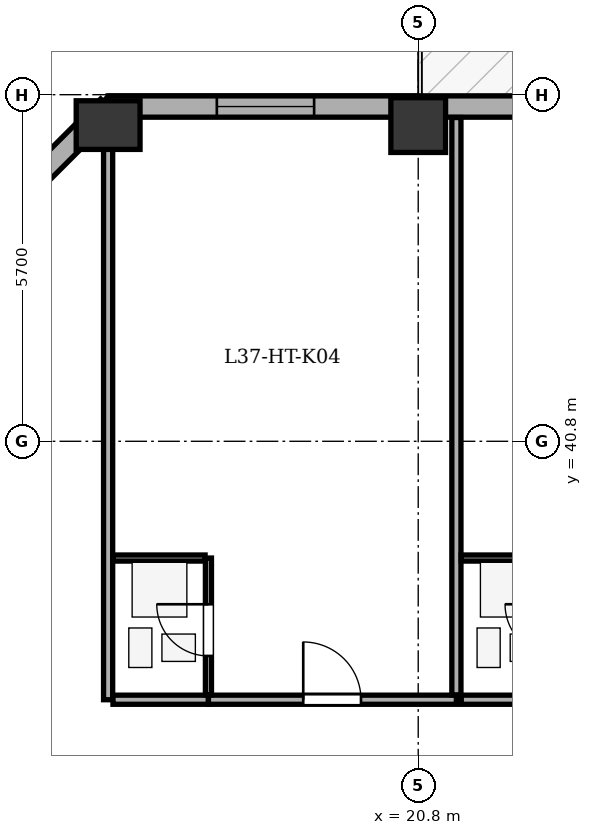
"""IFC4 building model, lengths in metres.
Left out: names, types, materials, properties, quantities, classifications, styles, units other than length and angle.
Written with IfcOpenShell. Run it as: python <this file> out.ifc"""

import sys

from ifc_helpers import new_model, si_unit, direction, frame, frame_2d, origin, origin_2d, place, context, subcontext, project, spatial, rectangle, extrude, element, fill, save


model = new_model("IFC4")
c1 = context("Model", 3, precision=1e-05, world=origin(), true_north=direction((0.0, 1.0)))
c2 = subcontext(c1, "Body", "Model", "MODEL_VIEW")
j1 = project(units=[si_unit("LENGTHUNIT", "METRE"), si_unit("PLANEANGLEUNIT", "RADIAN")], contexts=[c1])
p1 = place(None, origin())
s1 = spatial("IfcSite", under=j1, at=p1, CompositionType="ELEMENT")
p2 = place(p1, origin())
s2 = spatial("IfcBuilding", under=s1, at=p2, CompositionType="ELEMENT")
p3 = place(p2, frame((0.0, 0.0, 148.3)))
s3 = spatial("IfcBuildingStorey", under=s2, at=p3, CompositionType="ELEMENT", Elevation=148.3)
p4 = place(p3, frame((15.7, 46.0, 0.0), z_axis=(0.0, 0.0, 1.0), x_axis=(1.0, 0.0, 0.0)))
e1 = element("IfcColumn", 1, at=p4, inside=s3, PredefinedType="COLUMN", context=c2, shape_type="SweptSolid", body=[
    extrude(rectangle(XDim=0.8, YDim=1.05, at=origin_2d()), origin(), (0.0, 0.0, 1.0), 3.5),
])
p5 = place(p3, frame((20.8, 46.0, 0.0), z_axis=(0.0, 0.0, 1.0), x_axis=(1.0, 0.0, 0.0)))
e2 = element("IfcColumn", 2, at=p5, inside=s3, PredefinedType="COLUMN", context=c2, shape_type="SweptSolid", body=[
    extrude(rectangle(XDim=0.9, YDim=0.9, at=origin_2d()), origin(), (0.0, 0.0, 1.0), 3.5),
])
p6 = place(p3, frame((10.895, 41.5, 0.0), z_axis=(0.0, 0.0, 1.0), x_axis=(0.707106781187, 0.707106781187, 0.0)))
e3 = element("IfcWall", 3, at=p6, inside=s3, PredefinedType="STANDARD", context=c2, shape_type="SweptSolid", body=[
    extrude(rectangle(XDim=6.795, YDim=0.35, at=frame_2d((3.397, 0.0))), origin(), (0.0, 0.0, 1.0), 2.785),
])
p7 = place(p6, frame((2.698, 0.0, 0.75)))
e4 = element("IfcOpeningElement", 4, at=p7, cuts=e3, PredefinedType="OPENING", context=c2, shape_type="SweptSolid", body=[
    extrude(rectangle(XDim=1.4, YDim=1.65, at=frame_2d((0.7, 0.825))), frame((0.0, 0.185, 0.0), z_axis=(0.0, -1.0, 0.0), x_axis=(1.0, 0.0, 0.0)), (0.0, 0.0, 1.0), 0.37),
])
p8 = place(p3, frame((15.7, 46.305, 0.0), z_axis=(0.0, 0.0, 1.0), x_axis=(1.0, 0.0, 0.0)))
e5 = element("IfcWall", 5, at=p8, inside=s3, PredefinedType="STANDARD", context=c2, shape_type="SweptSolid", body=[
    extrude(rectangle(XDim=35.0, YDim=0.35, at=frame_2d((17.5, 0.0))), origin(), (0.0, 0.0, 1.0), 2.785),
])
p9 = place(p8, frame((8.0, 0.0, 0.0)))
e6 = element("IfcOpeningElement", 6, at=p9, cuts=e5, PredefinedType="OPENING", context=c2, shape_type="SweptSolid", body=[
    extrude(rectangle(XDim=1.0, YDim=2.02, at=frame_2d((0.5, 1.01))), frame((0.0, 0.185, 0.0), z_axis=(0.0, -1.0, 0.0), x_axis=(1.0, 0.0, 0.0)), (0.0, 0.0, 1.0), 0.37),
])
p10 = place(p8, frame((1.788, 0.0, 0.75)))
e7 = element("IfcOpeningElement", 7, at=p10, cuts=e5, PredefinedType="OPENING", context=c2, shape_type="SweptSolid", body=[
    extrude(rectangle(XDim=1.6, YDim=1.75, at=frame_2d((0.8, 0.875))), frame((0.0, 0.185, 0.0), z_axis=(0.0, -1.0, 0.0), x_axis=(1.0, 0.0, 0.0)), (0.0, 0.0, 1.0), 0.37),
])
p11 = place(p8, frame((14.495, 0.0, 0.75)))
e8 = element("IfcOpeningElement", 8, at=p11, cuts=e5, PredefinedType="OPENING", context=c2, shape_type="SweptSolid", body=[
    extrude(rectangle(XDim=1.6, YDim=1.75, at=frame_2d((0.8, 0.875))), frame((0.0, 0.185, 0.0), z_axis=(0.0, -1.0, 0.0), x_axis=(1.0, 0.0, 0.0)), (0.0, 0.0, 1.0), 0.37),
])
p12 = place(p8, frame((21.261, 0.0, 0.75)))
e9 = element("IfcOpeningElement", 9, at=p12, cuts=e5, PredefinedType="OPENING", context=c2, shape_type="SweptSolid", body=[
    extrude(rectangle(XDim=1.6, YDim=1.75, at=frame_2d((0.8, 0.875))), frame((0.0, 0.185, 0.0), z_axis=(0.0, -1.0, 0.0), x_axis=(1.0, 0.0, 0.0)), (0.0, 0.0, 1.0), 0.37),
])
p13 = place(p8, frame((26.486, 0.0, 0.75)))
e10 = element("IfcOpeningElement", 10, at=p13, cuts=e5, PredefinedType="OPENING", context=c2, shape_type="SweptSolid", body=[
    extrude(rectangle(XDim=1.6, YDim=1.75, at=frame_2d((0.8, 0.875))), frame((0.0, 0.185, 0.0), z_axis=(0.0, -1.0, 0.0), x_axis=(1.0, 0.0, 0.0)), (0.0, 0.0, 1.0), 0.37),
])
p14 = place(p8, frame((31.637, 0.0, 0.75)))
e11 = element("IfcOpeningElement", 11, at=p14, cuts=e5, PredefinedType="OPENING", context=c2, shape_type="SweptSolid", body=[
    extrude(rectangle(XDim=1.6, YDim=1.75, at=frame_2d((0.8, 0.875))), frame((0.0, 0.185, 0.0), z_axis=(0.0, -1.0, 0.0), x_axis=(1.0, 0.0, 0.0)), (0.0, 0.0, 1.0), 0.37),
])
p15 = place(p3, frame((15.7, 36.55, 0.0), z_axis=(0.0, 0.0, 1.0), x_axis=(0.0, 1.0, 0.0)))
e12 = element("IfcWall", 12, at=p15, inside=s3, PredefinedType="PARTITIONING", context=c2, shape_type="SweptSolid", body=[
    extrude(rectangle(XDim=9.575, YDim=0.15, at=frame_2d((4.788, 0.0))), origin(), (0.0, 0.0, 1.0), 3.2),
])
p16 = place(p3, frame((15.78, 36.55, 0.0), z_axis=(0.0, 0.0, 1.0), x_axis=(1.0, 0.0, 0.0)))
e13 = element("IfcWall", 13, at=p16, inside=s3, PredefinedType="PARTITIONING", context=c2, shape_type="SweptSolid", body=[
    extrude(rectangle(XDim=1.57, YDim=0.15, at=frame_2d((0.785, 0.0))), origin(), (0.0, 0.0, 1.0), 3.2),
])
p17 = place(p3, frame((17.35, 36.55, 0.0), z_axis=(0.0, 0.0, 1.0), x_axis=(1.0, 0.0, 0.0)))
e14 = element("IfcWall", 14, at=p17, inside=s3, PredefinedType="PARTITIONING", context=c2, shape_type="SweptSolid", body=[
    extrude(rectangle(XDim=4.078, YDim=0.15, at=frame_2d((2.039, 0.0))), origin(), (0.0, 0.0, 1.0), 3.2),
])
p18 = place(p17, frame((1.559, 0.0, 0.0)))
e15 = element("IfcOpeningElement", 15, at=p18, cuts=e14, PredefinedType="OPENING", context=c2, shape_type="SweptSolid", body=[
    extrude(rectangle(XDim=0.95, YDim=2.1, at=frame_2d((0.475, 1.05))), frame((0.0, 0.085, 0.0), z_axis=(0.0, -1.0, 0.0), x_axis=(1.0, 0.0, 0.0)), (0.0, 0.0, 1.0), 0.17),
])
p19 = place(p3, frame((17.35, 36.63, 0.0), z_axis=(0.0, 0.0, 1.0), x_axis=(0.0, 1.0, 0.0)))
e16 = element("IfcWall", 16, at=p19, inside=s3, PredefinedType="PARTITIONING", context=c2, shape_type="SweptSolid", body=[
    extrude(rectangle(XDim=2.25, YDim=0.1, at=frame_2d((1.125, 0.0))), origin(), (0.0, 0.0, 1.0), 3.2),
])
p20 = place(p19, frame((0.64, 0.0, 0.0)))
e17 = element("IfcOpeningElement", 17, at=p20, cuts=e16, PredefinedType="OPENING", context=c2, shape_type="SweptSolid", body=[
    extrude(rectangle(XDim=0.85, YDim=2.05, at=frame_2d((0.425, 1.025))), frame((0.0, 0.06, 0.0), z_axis=(0.0, -1.0, 0.0), x_axis=(1.0, 0.0, 0.0)), (0.0, 0.0, 1.0), 0.12),
])
p21 = place(p3, frame((15.78, 38.88, 0.0), z_axis=(0.0, 0.0, 1.0), x_axis=(1.0, 0.0, 0.0)))
e18 = element("IfcWall", 18, at=p21, inside=s3, PredefinedType="PARTITIONING", context=c2, shape_type="SweptSolid", body=[
    extrude(rectangle(XDim=1.515, YDim=0.1, at=frame_2d((0.757, 0.0))), origin(), (0.0, 0.0, 1.0), 3.2),
])
p22 = place(p3, frame((21.428, 36.63, 0.0), z_axis=(0.0, 0.0, 1.0), x_axis=(0.0, 1.0, 0.0)))
e19 = element("IfcWall", 19, at=p22, inside=s3, PredefinedType="PARTITIONING", context=c2, shape_type="SweptSolid", body=[
    extrude(rectangle(XDim=9.495, YDim=0.15, at=frame_2d((4.748, 0.0))), origin(), (0.0, 0.0, 1.0), 3.2),
])
p23 = place(p3, frame((21.508, 36.55, 0.0), z_axis=(0.0, 0.0, 1.0), x_axis=(1.0, 0.0, 0.0)))
e20 = element("IfcWall", 20, at=p23, inside=s3, PredefinedType="PARTITIONING", context=c2, shape_type="SweptSolid", body=[
    extrude(rectangle(XDim=1.57, YDim=0.15, at=frame_2d((0.785, 0.0))), origin(), (0.0, 0.0, 1.0), 3.2),
])
p24 = place(p3, frame((21.508, 38.88, 0.0), z_axis=(0.0, 0.0, 1.0), x_axis=(1.0, 0.0, 0.0)))
e21 = element("IfcWall", 21, at=p24, inside=s3, PredefinedType="PARTITIONING", context=c2, shape_type="SweptSolid", body=[
    extrude(rectangle(XDim=1.515, YDim=0.1, at=frame_2d((0.757, 0.0))), origin(), (0.0, 0.0, 1.0), 3.2),
])
p25 = place(p10, origin())
e22 = element("IfcWindow", 22, at=p25, inside=s3, PartitioningType="SINGLE_PANEL", PredefinedType="WINDOW", context=c2, shape_type="SweptSolid", body=[
    extrude(rectangle(XDim=1.6, YDim=1.75, at=frame_2d((0.8, 0.875))), frame((0.0, -0.01, 0.0), z_axis=(0.0, -1.0, 0.0), x_axis=(1.0, 0.0, 0.0)), (0.0, 0.0, 1.0), 0.06),
])
fill(e7, e22)
p26 = place(p20, origin())
e23 = element("IfcDoor", 23, at=p26, inside=s3, OperationType="SINGLE_SWING_RIGHT", PredefinedType="DOOR", context=c2, shape_type="SweptSolid", body=[
    extrude(rectangle(XDim=0.85, YDim=2.05, at=frame_2d((0.425, 1.025))), frame((0.0, 0.025, 0.0), z_axis=(0.0, -1.0, 0.0), x_axis=(1.0, 0.0, 0.0)), (0.0, 0.0, 1.0), 0.05),
])
fill(e17, e23)
p27 = place(p18, origin())
e24 = element("IfcDoor", 24, at=p27, inside=s3, OperationType="SINGLE_SWING_LEFT", PredefinedType="DOOR", context=c2, shape_type="SweptSolid", body=[
    extrude(rectangle(XDim=0.95, YDim=2.1, at=frame_2d((0.475, 1.05))), frame((0.0, 0.025, 0.0), z_axis=(0.0, -1.0, 0.0), x_axis=(1.0, 0.0, 0.0)), (0.0, 0.0, 1.0), 0.05),
])
fill(e15, e24)
save(model, sys.argv[1])
